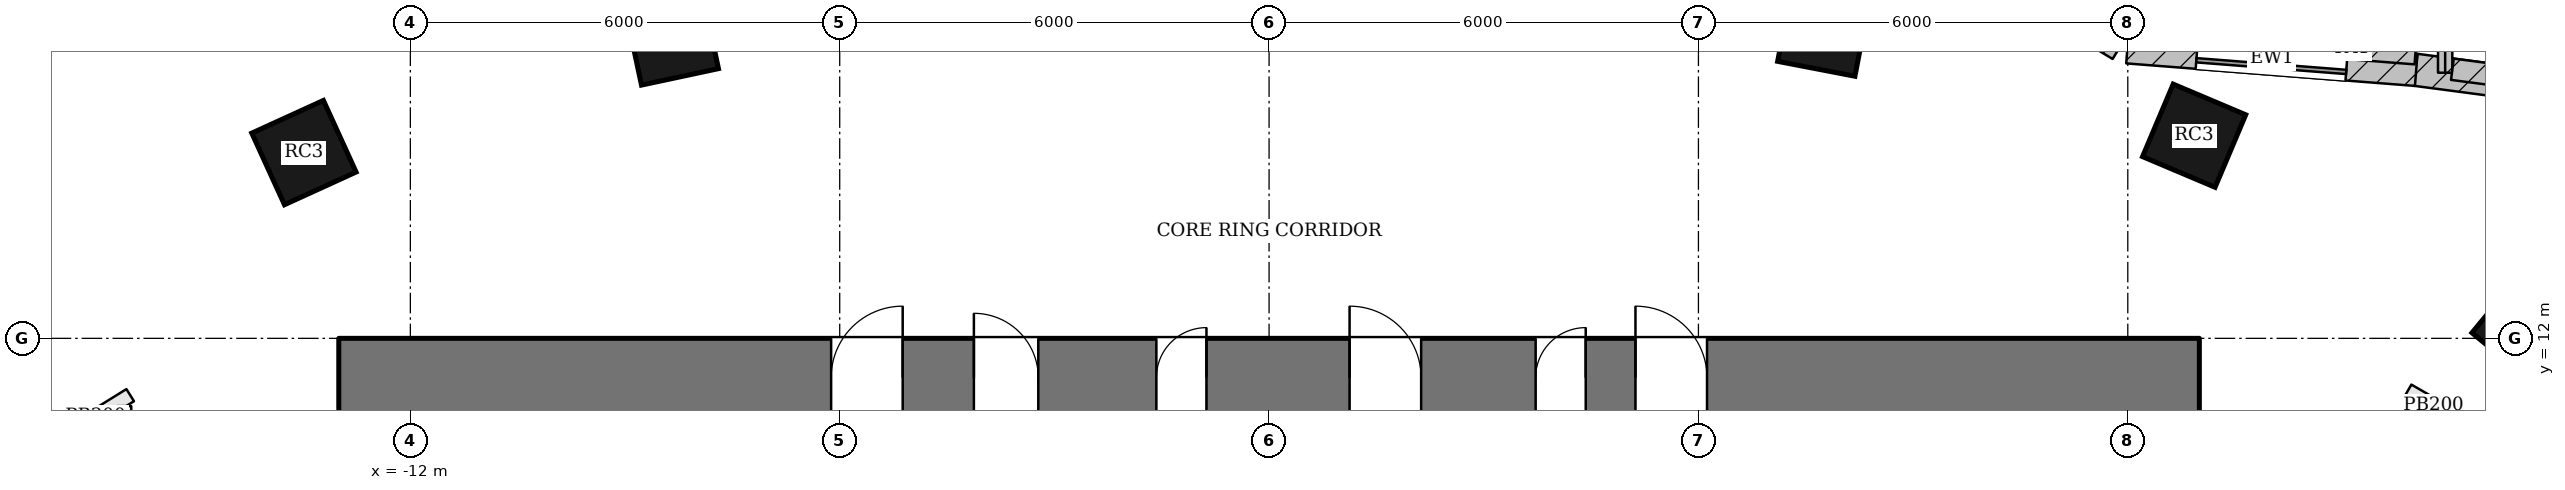
"""IFC4 building model, lengths in metres.
Left out: names, types, materials, properties, quantities, classifications, styles, units other than length and angle.
Written with IfcOpenShell. Run it as: python <this file> out.ifc"""

import sys

from ifc_helpers import new_model, si_unit, direction, frame, frame_2d, origin, origin_2d, place, context, subcontext, project, spatial, rectangle, extrude, element, fill, save


model = new_model("IFC4")
c1 = context("Model", 3, precision=1e-05, world=origin(), true_north=direction((0.0, 1.0)))
c2 = subcontext(c1, "Body", "Model", "MODEL_VIEW")
j1 = project(units=[si_unit("LENGTHUNIT", "METRE"), si_unit("PLANEANGLEUNIT", "RADIAN")], contexts=[c1])
p1 = place(None, origin())
s1 = spatial("IfcSite", under=j1, at=p1, CompositionType="ELEMENT")
p2 = place(p1, origin())
s2 = spatial("IfcBuilding", under=s1, at=p2, CompositionType="ELEMENT")
p3 = place(p2, frame((0.0, 0.0, 150.0)))
s3 = spatial("IfcBuildingStorey", under=s2, at=p3, CompositionType="ELEMENT", Elevation=150.0)
p4 = place(p3, frame((-13.0, 11.45, 0.0), z_axis=(0.0, 0.0, 1.0), x_axis=(1.0, 0.0, 0.0)))
e1 = element("IfcWall", 1, at=p4, inside=s3, PredefinedType="SHEAR", context=c2, shape_type="SweptSolid", body=[
    extrude(rectangle(XDim=26.0, YDim=1.1, at=frame_2d((13.0, 0.0))), origin(), (0.0, 0.0, 1.0), 3.9),
])
p5 = place(p4, frame((8.875, 0.0, 0.0)))
e2 = element("IfcOpeningElement", 2, at=p5, cuts=e1, PredefinedType="OPENING", context=c2, shape_type="SweptSolid", body=[
    extrude(rectangle(XDim=0.9, YDim=2.1, at=frame_2d((0.45, 1.05))), frame((0.0, 0.56, 0.0), z_axis=(0.0, -1.0, 0.0), x_axis=(1.0, 0.0, 0.0)), (0.0, 0.0, 1.0), 1.12),
])
p6 = place(p4, frame((11.425, 0.0, 0.0)))
e3 = element("IfcOpeningElement", 3, at=p6, cuts=e1, PredefinedType="OPENING", context=c2, shape_type="SweptSolid", body=[
    extrude(rectangle(XDim=0.7, YDim=2.1, at=frame_2d((0.35, 1.05))), frame((0.0, 0.56, 0.0), z_axis=(0.0, -1.0, 0.0), x_axis=(1.0, 0.0, 0.0)), (0.0, 0.0, 1.0), 1.12),
])
p7 = place(p4, frame((14.125, 0.0, 0.0)))
e4 = element("IfcOpeningElement", 4, at=p7, cuts=e1, PredefinedType="OPENING", context=c2, shape_type="SweptSolid", body=[
    extrude(rectangle(XDim=1.0, YDim=2.1, at=frame_2d((0.5, 1.05))), frame((0.0, 0.56, 0.0), z_axis=(0.0, -1.0, 0.0), x_axis=(1.0, 0.0, 0.0)), (0.0, 0.0, 1.0), 1.12),
])
p8 = place(p4, frame((16.725, 0.0, 0.0)))
e5 = element("IfcOpeningElement", 5, at=p8, cuts=e1, PredefinedType="OPENING", context=c2, shape_type="SweptSolid", body=[
    extrude(rectangle(XDim=0.7, YDim=2.1, at=frame_2d((0.35, 1.05))), frame((0.0, 0.56, 0.0), z_axis=(0.0, -1.0, 0.0), x_axis=(1.0, 0.0, 0.0)), (0.0, 0.0, 1.0), 1.12),
])
p9 = place(p4, frame((6.88, 0.0, 0.0)))
e6 = element("IfcOpeningElement", 6, at=p9, cuts=e1, PredefinedType="OPENING", context=c2, shape_type="SweptSolid", body=[
    extrude(rectangle(XDim=1.0, YDim=2.1, at=frame_2d((0.5, 1.05))), frame((0.0, 0.56, 0.0), z_axis=(0.0, -1.0, 0.0), x_axis=(1.0, 0.0, 0.0)), (0.0, 0.0, 1.0), 1.12),
])
p10 = place(p4, frame((18.12, 0.0, 0.0)))
e7 = element("IfcOpeningElement", 7, at=p10, cuts=e1, PredefinedType="OPENING", context=c2, shape_type="SweptSolid", body=[
    extrude(rectangle(XDim=1.0, YDim=2.1, at=frame_2d((0.5, 1.05))), frame((0.0, 0.56, 0.0), z_axis=(0.0, -1.0, 0.0), x_axis=(1.0, 0.0, 0.0)), (0.0, 0.0, 1.0), 1.12),
])
for number, where, z_axis, x_axis in (
    (8, (17.584, 12.151, 0.0), (0.0, 0.0, 1.0), (-0.771, 0.637, 0.0)),
    (9, (12.927, 14.832, 0.0), (0.0, 0.0, 1.0), (-0.921, 0.389, 0.0)),
    (10, (7.751, 16.307, 0.0), (0.0, 0.0, 1.0), (-0.982, 0.189, 0.0)),
    (11, (-8.347, 16.192, 0.0), (0.0, 0.0, 1.0), (-0.978, -0.209, 0.0)),
    (12, (-13.487, 14.596, 0.0), (0.0, 0.0, 1.0), (-0.91, -0.415, 0.0)),
):
    element("IfcColumn", number, at=place(p3, frame(where, z_axis=z_axis, x_axis=x_axis)), inside=s3, PredefinedType="COLUMN", context=c2, shape_type="SweptSolid", body=[
        extrude(rectangle(XDim=1.1, YDim=1.1, at=origin_2d()), origin(), (0.0, 0.0, 1.0), 3.9),
    ])
p11 = place(p3, frame((21.044, 15.091, 0.0), z_axis=(0.0, 0.0, 1.0), x_axis=(-0.991409967396, 0.130790965086, 0.0)))
e13 = element("IfcWall", 13, at=p11, inside=s3, PredefinedType="SOLIDWALL", context=c2, shape_type="SweptSolid", body=[
    extrude(rectangle(XDim=5.068, YDim=0.45, at=frame_2d((2.534, 0.0))), origin(), (0.0, 0.0, 1.0), 3.7),
])
p12 = place(p11, frame((1.484, 0.0, 0.9)))
e14 = element("IfcOpeningElement", 14, at=p12, cuts=e13, PredefinedType="OPENING", context=c2, shape_type="SweptSolid", body=[
    extrude(rectangle(XDim=2.1, YDim=2.3, at=frame_2d((1.05, 1.15))), frame((0.0, 0.235, 0.0), z_axis=(0.0, -1.0, 0.0), x_axis=(1.0, 0.0, 0.0)), (0.0, 0.0, 1.0), 0.47),
])
p13 = place(p3, frame((16.03, 15.752, 0.0), z_axis=(0.0, 0.0, 1.0), x_axis=(-0.996967628157, 0.077817404267, 0.0)))
e15 = element("IfcWall", 15, at=p13, inside=s3, PredefinedType="SOLIDWALL", context=c2, shape_type="SweptSolid", body=[
    extrude(rectangle(XDim=4.047, YDim=0.45, at=frame_2d((2.023, 0.0))), origin(), (0.0, 0.0, 1.0), 3.7),
])
p14 = place(p13, frame((0.974, 0.0, 0.9)))
e16 = element("IfcOpeningElement", 16, at=p14, cuts=e15, PredefinedType="OPENING", context=c2, shape_type="SweptSolid", body=[
    extrude(rectangle(XDim=2.1, YDim=2.3, at=frame_2d((1.05, 1.15))), frame((0.0, 0.235, 0.0), z_axis=(0.0, -1.0, 0.0), x_axis=(1.0, 0.0, 0.0)), (0.0, 0.0, 1.0), 0.47),
])
p15 = place(p3, frame((11.905, 16.096, 0.0), z_axis=(0.0, 0.0, 1.0), x_axis=(-0.854609476155, 0.519271261738, 0.0)))
e17 = element("IfcWall", 17, at=p15, inside=s3, PredefinedType="SOLIDWALL", context=c2, shape_type="SweptSolid", body=[
    extrude(rectangle(XDim=3.325, YDim=0.45, at=frame_2d((1.663, 0.0))), origin(), (0.0, 0.0, 1.0), 3.7),
])
p16 = place(p15, frame((0.612, 0.0, 0.9)))
e18 = element("IfcOpeningElement", 18, at=p16, cuts=e17, PredefinedType="OPENING", context=c2, shape_type="SweptSolid", body=[
    extrude(rectangle(XDim=2.1, YDim=2.3, at=frame_2d((1.05, 1.15))), frame((0.0, 0.235, 0.0), z_axis=(0.0, -1.0, 0.0), x_axis=(1.0, 0.0, 0.0)), (0.0, 0.0, 1.0), 0.47),
])
p17 = place(p3, frame((16.435, 15.712, 0.0), z_axis=(0.0, 0.0, 1.0), x_axis=(-0.000279017846, 0.999999961075, 0.0)))
e19 = element("IfcWall", 19, at=p17, inside=s3, PredefinedType="SOLIDWALL", context=c2, shape_type="SweptSolid", body=[
    extrude(rectangle(XDim=1.75, YDim=0.2, at=frame_2d((0.875, 0.0))), origin(), (0.0, 0.0, 1.0), 3.7),
])
p18 = place(p3, frame((20.923, 15.182, 3.9), z_axis=(0.0, 0.0, 1.0), x_axis=(-0.991411041714, 0.130782821377, 0.0)))
e20 = element("IfcWall", 20, at=p18, inside=s3, PredefinedType="PARAPET", context=c2, shape_type="SweptSolid", body=[
    extrude(rectangle(XDim=4.424, YDim=0.3, at=frame_2d((2.212, 0.0))), origin(), (0.0, 0.0, 1.0), 1.1),
])
p19 = place(p3, frame((16.019, 15.979, 3.9), z_axis=(0.0, 0.0, 1.0), x_axis=(-0.99696580474, 0.077840761676, 0.0)))
e21 = element("IfcWall", 21, at=p19, inside=s3, PredefinedType="PARAPET", context=c2, shape_type="SweptSolid", body=[
    extrude(rectangle(XDim=1.778, YDim=0.3, at=frame_2d((0.889, 0.0))), origin(), (0.0, 0.0, 1.0), 1.1),
])
p20 = place(p3, frame((-16.883, 10.605, 0.0), z_axis=(0.0, 0.0, 1.0), x_axis=(0.84954745962, 0.527512193085, 0.0)))
e22 = element("IfcWall", 22, at=p20, inside=s3, PredefinedType="PARTITIONING", context=c2, shape_type="SweptSolid", body=[
    extrude(rectangle(XDim=1.139, YDim=0.2, at=frame_2d((0.57, 0.0))), origin(), (0.0, 0.0, 1.0), 3.7),
])
p21 = place(p3, frame((-16.0, 11.053, 0.0), z_axis=(0.0, 0.0, 1.0), x_axis=(0.0, -1.0, 0.0)))
e23 = element("IfcWall", 23, at=p21, inside=s3, PredefinedType="PARTITIONING", context=c2, shape_type="SweptSolid", body=[
    extrude(rectangle(XDim=16.953, YDim=0.2, at=frame_2d((8.477, 0.0))), origin(), (0.0, 0.0, 1.0), 3.7),
])
p22 = place(p21, frame((6.077, 0.0, 0.0)))
e24 = element("IfcOpeningElement", 24, at=p22, cuts=e23, PredefinedType="OPENING", context=c2, shape_type="SweptSolid", body=[
    extrude(rectangle(XDim=1.8, YDim=2.1, at=frame_2d((0.9, 1.05))), frame((0.0, 0.11, 0.0), z_axis=(0.0, -1.0, 0.0), x_axis=(1.0, 0.0, 0.0)), (0.0, 0.0, 1.0), 0.22),
])
p23 = place(p3, frame((15.913, 11.267, 0.0), z_axis=(0.0, 0.0, 1.0), x_axis=(0.866219676164, -0.4996633593, 0.0)))
e25 = element("IfcWall", 25, at=p23, inside=s3, PredefinedType="PARTITIONING", context=c2, shape_type="SweptSolid", body=[
    extrude(rectangle(XDim=0.834, YDim=0.2, at=frame_2d((0.417, 0.0))), origin(), (0.0, 0.0, 1.0), 3.7),
])
p24 = place(p3, frame((16.0, -5.9, 0.0), z_axis=(0.0, 0.0, 1.0), x_axis=(0.0, 1.0, 0.0)))
e26 = element("IfcWall", 26, at=p24, inside=s3, PredefinedType="PARTITIONING", context=c2, shape_type="SweptSolid", body=[
    extrude(rectangle(XDim=17.017, YDim=0.2, at=frame_2d((8.508, 0.0))), origin(), (0.0, 0.0, 1.0), 3.7),
])
p25 = place(p24, frame((9.108, 0.0, 0.0)))
e27 = element("IfcOpeningElement", 27, at=p25, cuts=e26, PredefinedType="OPENING", context=c2, shape_type="SweptSolid", body=[
    extrude(rectangle(XDim=1.8, YDim=2.1, at=frame_2d((0.9, 1.05))), frame((0.0, 0.11, 0.0), z_axis=(0.0, -1.0, 0.0), x_axis=(1.0, 0.0, 0.0)), (0.0, 0.0, 1.0), 0.22),
])
p26 = place(p14, origin())
e28 = element("IfcWindow", 28, at=p26, inside=s3, PartitioningType="SINGLE_PANEL", PredefinedType="WINDOW", context=c2, shape_type="SweptSolid", body=[
    extrude(rectangle(XDim=2.1, YDim=2.3, at=frame_2d((1.05, 1.15))), frame((0.0, 0.135, 0.0), z_axis=(0.0, -1.0, 0.0), x_axis=(1.0, 0.0, 0.0)), (0.0, 0.0, 1.0), 0.06),
])
fill(e16, e28)
p27 = place(p5, origin())
e29 = element("IfcDoor", 29, at=p27, inside=s3, OperationType="SINGLE_SWING_LEFT", PredefinedType="DOOR", context=c2, shape_type="SweptSolid", body=[
    extrude(rectangle(XDim=0.9, YDim=2.1, at=frame_2d((0.45, 1.05))), frame((0.0, 0.025, 0.0), z_axis=(0.0, -1.0, 0.0), x_axis=(1.0, 0.0, 0.0)), (0.0, 0.0, 1.0), 0.05),
])
fill(e2, e29)
p28 = place(p6, origin())
e30 = element("IfcDoor", 30, at=p28, inside=s3, OperationType="SINGLE_SWING_RIGHT", PredefinedType="DOOR", context=c2, shape_type="SweptSolid", body=[
    extrude(rectangle(XDim=0.7, YDim=2.1, at=frame_2d((0.35, 1.05))), frame((0.0, 0.025, 0.0), z_axis=(0.0, -1.0, 0.0), x_axis=(1.0, 0.0, 0.0)), (0.0, 0.0, 1.0), 0.05),
])
fill(e3, e30)
p29 = place(p7, origin())
e31 = element("IfcDoor", 31, at=p29, inside=s3, OperationType="SINGLE_SWING_LEFT", PredefinedType="DOOR", context=c2, shape_type="SweptSolid", body=[
    extrude(rectangle(XDim=1.0, YDim=2.1, at=frame_2d((0.5, 1.05))), frame((0.0, 0.025, 0.0), z_axis=(0.0, -1.0, 0.0), x_axis=(1.0, 0.0, 0.0)), (0.0, 0.0, 1.0), 0.05),
])
fill(e4, e31)
p30 = place(p8, origin())
e32 = element("IfcDoor", 32, at=p30, inside=s3, OperationType="SINGLE_SWING_RIGHT", PredefinedType="DOOR", context=c2, shape_type="SweptSolid", body=[
    extrude(rectangle(XDim=0.7, YDim=2.1, at=frame_2d((0.35, 1.05))), frame((0.0, 0.025, 0.0), z_axis=(0.0, -1.0, 0.0), x_axis=(1.0, 0.0, 0.0)), (0.0, 0.0, 1.0), 0.05),
])
fill(e5, e32)
p31 = place(p9, origin())
e33 = element("IfcDoor", 33, at=p31, inside=s3, OperationType="SINGLE_SWING_RIGHT", PredefinedType="DOOR", context=c2, shape_type="SweptSolid", body=[
    extrude(rectangle(XDim=1.0, YDim=2.1, at=frame_2d((0.5, 1.05))), frame((0.0, 0.025, 0.0), z_axis=(0.0, -1.0, 0.0), x_axis=(1.0, 0.0, 0.0)), (0.0, 0.0, 1.0), 0.05),
])
fill(e6, e33)
p32 = place(p10, origin())
e34 = element("IfcDoor", 34, at=p32, inside=s3, OperationType="SINGLE_SWING_LEFT", PredefinedType="DOOR", context=c2, shape_type="SweptSolid", body=[
    extrude(rectangle(XDim=1.0, YDim=2.1, at=frame_2d((0.5, 1.05))), frame((0.0, 0.025, 0.0), z_axis=(0.0, -1.0, 0.0), x_axis=(1.0, 0.0, 0.0)), (0.0, 0.0, 1.0), 0.05),
])
fill(e7, e34)
save(model, sys.argv[1])
